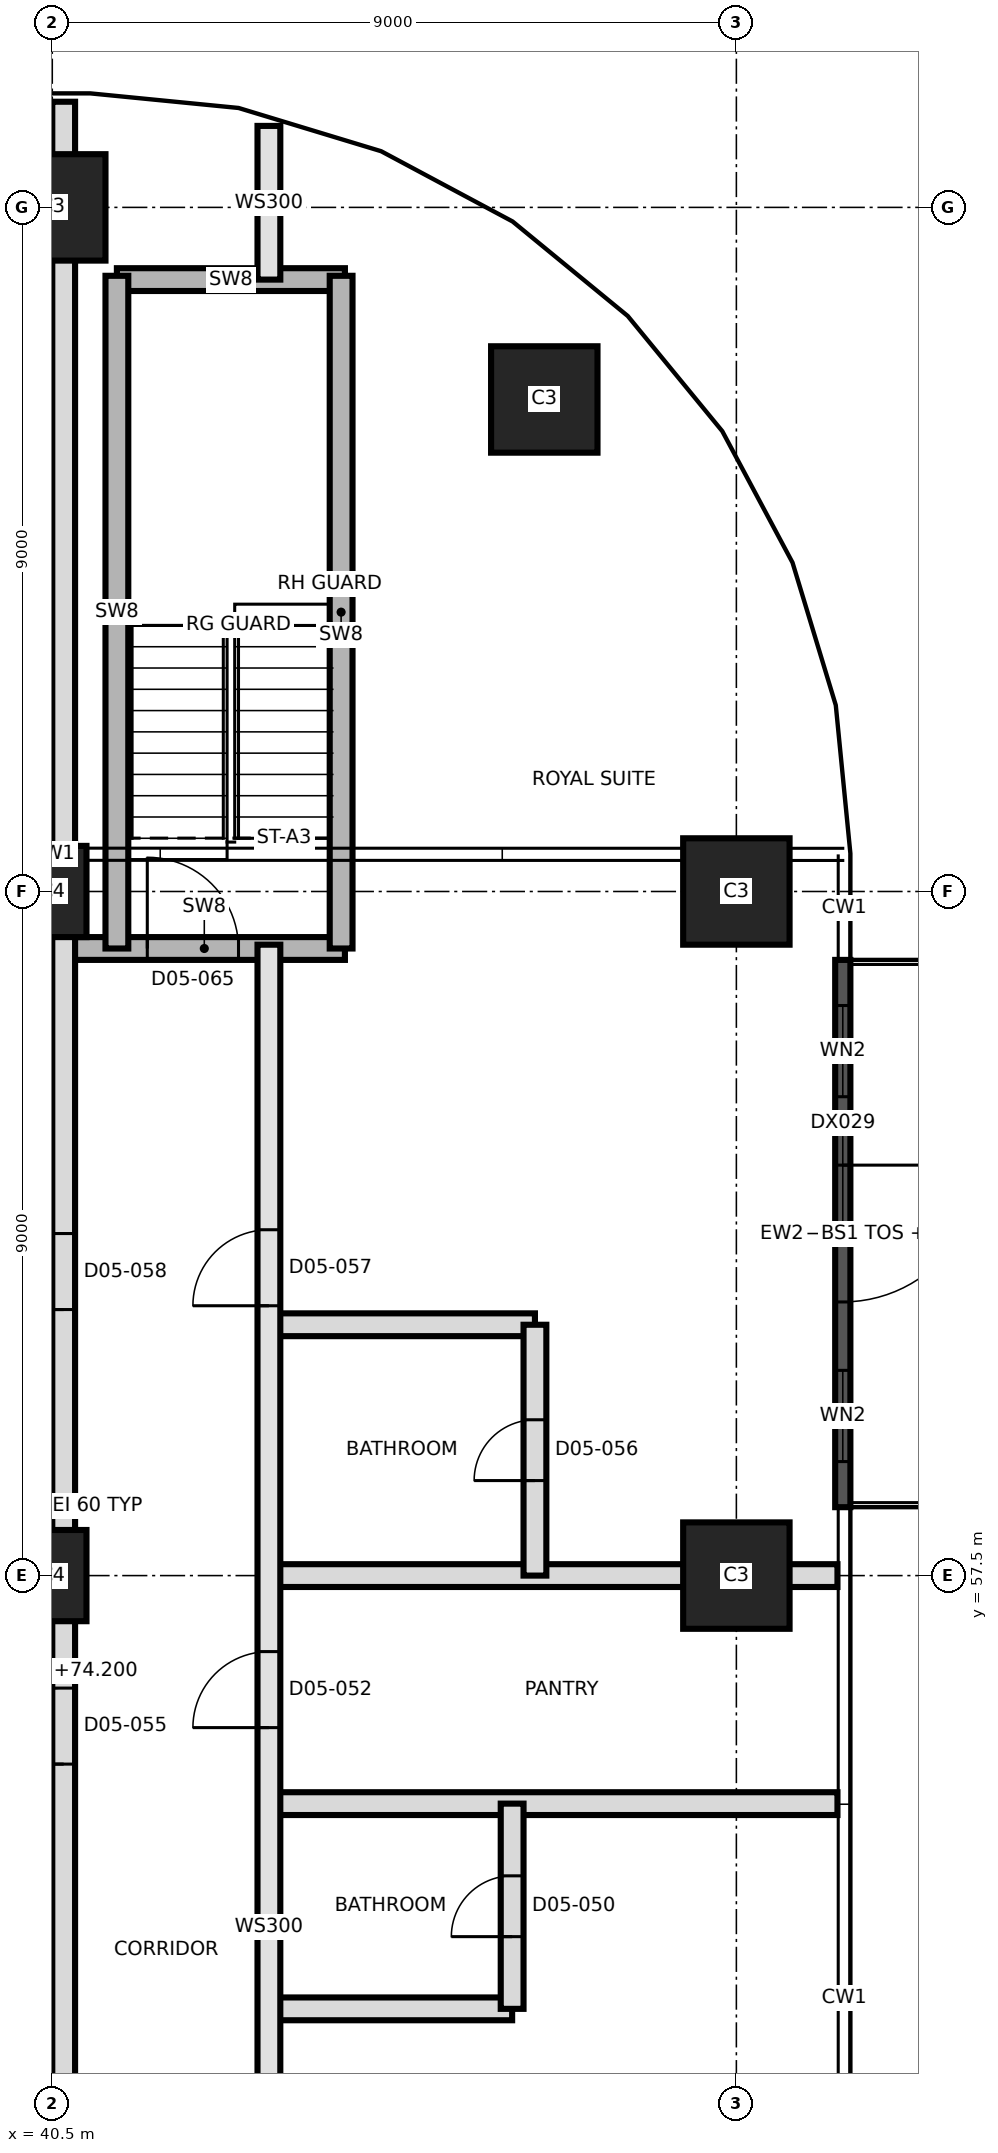
"""IFC4 building model, lengths in metres.
Left out: names, types, materials, properties, quantities, classifications, styles, units other than length and angle.
Written with IfcOpenShell. Run it as: python <this file> out.ifc"""

import sys

from ifc_helpers import new_model, si_unit, direction, frame, frame_2d, origin, origin_2d, place, context, subcontext, project, spatial, rectangle, extrude, element, fill, save


model = new_model("IFC4")
c1 = context("Model", 3, precision=1e-05, world=origin(), true_north=direction((0.0, 1.0)))
c2 = subcontext(c1, "Body", "Model", "MODEL_VIEW")
j1 = project(units=[si_unit("LENGTHUNIT", "METRE"), si_unit("PLANEANGLEUNIT", "RADIAN")], contexts=[c1])
p1 = place(None, origin())
s1 = spatial("IfcSite", under=j1, at=p1, CompositionType="ELEMENT")
p2 = place(p1, origin())
s2 = spatial("IfcBuilding", under=s1, at=p2, CompositionType="ELEMENT")
p3 = place(p2, frame((0.0, 0.0, 74.2)))
s3 = spatial("IfcBuildingStorey", under=s2, at=p3, CompositionType="ELEMENT", Elevation=74.2)
p4 = place(p3, frame((40.5, 57.5, 0.0), z_axis=(0.0, 0.0, 1.0), x_axis=(0.0, 1.0, 0.0)))
e1 = element("IfcColumn", 1, at=p4, inside=s3, PredefinedType="COLUMN", context=c2, shape_type="SweptSolid", body=[
    extrude(rectangle(XDim=1.2, YDim=0.9, at=origin_2d()), origin(), (0.0, 0.0, 1.0), 3.7),
])
p5 = place(p3, frame((49.5, 57.5, 0.0), z_axis=(0.0, 0.0, 1.0), x_axis=(1.0, 0.0, 0.0)))
e2 = element("IfcColumn", 2, at=p5, inside=s3, PredefinedType="COLUMN", context=c2, shape_type="SweptSolid", body=[
    extrude(rectangle(XDim=1.4, YDim=1.4, at=origin_2d()), origin(), (0.0, 0.0, 1.0), 3.7),
])
p6 = place(p3, frame((40.5, 66.5, 0.0), z_axis=(0.0, 0.0, 1.0), x_axis=(0.0, 1.0, 0.0)))
e3 = element("IfcColumn", 3, at=p6, inside=s3, PredefinedType="COLUMN", context=c2, shape_type="SweptSolid", body=[
    extrude(rectangle(XDim=1.2, YDim=0.9, at=origin_2d()), origin(), (0.0, 0.0, 1.0), 3.7),
])
for number, where, z_axis, x_axis in (
    (4, (49.5, 66.5, 0.0), (0.0, 0.0, 1.0), (1.0, 0.0, 0.0)),
    (5, (46.973, 72.973, 0.0), (0.0, 0.0, 1.0), (1.0, 0.0, 0.0)),
    (6, (40.5, 75.5, 0.0), (0.0, 0.0, 1.0), (1.0, 0.0, 0.0)),
):
    element("IfcColumn", number, at=place(p3, frame(where, z_axis=z_axis, x_axis=x_axis)), inside=s3, PredefinedType="COLUMN", context=c2, shape_type="SweptSolid", body=[
        extrude(rectangle(XDim=1.4, YDim=1.4, at=origin_2d()), origin(), (0.0, 0.0, 1.0), 3.7),
    ])
p7 = place(p3, frame((50.9, 65.6, 0.0), z_axis=(0.0, 0.0, 1.0), x_axis=(0.0, -1.0, 0.0)))
e7 = element("IfcWall", 7, at=p7, inside=s3, PredefinedType="SOLIDWALL", context=c2, shape_type="SweptSolid", body=[
    extrude(rectangle(XDim=7.2, YDim=0.2, at=frame_2d((3.6, 0.0))), origin(), (0.0, 0.0, 1.0), 3.4),
])
p8 = place(p7, frame((2.7, 0.0, 0.0)))
e8 = element("IfcOpeningElement", 8, at=p8, cuts=e7, PredefinedType="OPENING", context=c2, shape_type="SweptSolid", body=[
    extrude(rectangle(XDim=1.8, YDim=2.4, at=frame_2d((0.9, 1.2))), frame((0.0, 0.11, 0.0), z_axis=(0.0, -1.0, 0.0), x_axis=(1.0, 0.0, 0.0)), (0.0, 0.0, 1.0), 0.22),
])
p9 = place(p7, frame((5.4, 0.0, 0.9)))
e9 = element("IfcOpeningElement", 9, at=p9, cuts=e7, PredefinedType="OPENING", context=c2, shape_type="SweptSolid", body=[
    extrude(rectangle(XDim=1.2, YDim=2.1, at=frame_2d((0.6, 1.05))), frame((0.0, 0.11, 0.0), z_axis=(0.0, -1.0, 0.0), x_axis=(1.0, 0.0, 0.0)), (0.0, 0.0, 1.0), 0.22),
])
p10 = place(p7, frame((0.6, 0.0, 0.9)))
e10 = element("IfcOpeningElement", 10, at=p10, cuts=e7, PredefinedType="OPENING", context=c2, shape_type="SweptSolid", body=[
    extrude(rectangle(XDim=1.2, YDim=2.1, at=frame_2d((0.6, 1.05))), frame((0.0, 0.11, 0.0), z_axis=(0.0, -1.0, 0.0), x_axis=(1.0, 0.0, 0.0)), (0.0, 0.0, 1.0), 0.22),
])
for number, where, z_axis, x_axis in (
    (11, (37.45, 50.84, 0.0), (0.0, 0.0, 1.0), (1.0, 0.0, 0.0)),
    (12, (43.35, 51.8, 0.0), (0.0, 0.0, 1.0), (1.0, 0.0, 0.0)),
):
    element("IfcWall", number, at=place(p3, frame(where, z_axis=z_axis, x_axis=x_axis)), inside=s3, PredefinedType="PARTITIONING", context=c2, shape_type="SweptSolid", body=[
        extrude(rectangle(XDim=3.2, YDim=0.3, at=frame_2d((1.6, 0.0))), origin(), (0.0, 0.0, 1.0), 3.4),
    ])
p11 = place(p3, frame((30.35, 53.54, 0.0), z_axis=(0.0, 0.0, 1.0), x_axis=(1.0, 0.0, 0.0)))
e13 = element("IfcWall", 13, at=p11, inside=s3, PredefinedType="PARTITIONING", context=c2, shape_type="SweptSolid", body=[
    extrude(rectangle(XDim=10.3, YDim=0.3, at=frame_2d((5.15, 0.0))), origin(), (0.0, 0.0, 1.0), 3.4),
])
p12 = place(p3, frame((43.35, 54.5, 0.0), z_axis=(0.0, 0.0, 1.0), x_axis=(1.0, 0.0, 0.0)))
e14 = element("IfcWall", 14, at=p12, inside=s3, PredefinedType="PARTITIONING", context=c2, shape_type="SweptSolid", body=[
    extrude(rectangle(XDim=7.48, YDim=0.3, at=frame_2d((3.74, 0.0))), origin(), (0.0, 0.0, 1.0), 3.4),
])
p13 = place(p3, frame((30.35, 57.5, 0.0), z_axis=(0.0, 0.0, 1.0), x_axis=(1.0, 0.0, 0.0)))
e15 = element("IfcWall", 15, at=p13, inside=s3, PredefinedType="PARTITIONING", context=c2, shape_type="SweptSolid", body=[
    extrude(rectangle(XDim=10.3, YDim=0.3, at=frame_2d((5.15, 0.0))), origin(), (0.0, 0.0, 1.0), 3.4),
])
p14 = place(p3, frame((43.35, 57.5, 0.0), z_axis=(0.0, 0.0, 1.0), x_axis=(1.0, 0.0, 0.0)))
e16 = element("IfcWall", 16, at=p14, inside=s3, PredefinedType="PARTITIONING", context=c2, shape_type="SweptSolid", body=[
    extrude(rectangle(XDim=7.48, YDim=0.3, at=frame_2d((3.74, 0.0))), origin(), (0.0, 0.0, 1.0), 3.4),
])
p15 = place(p3, frame((43.35, 60.8, 0.0), z_axis=(0.0, 0.0, 1.0), x_axis=(1.0, 0.0, 0.0)))
e17 = element("IfcWall", 17, at=p15, inside=s3, PredefinedType="PARTITIONING", context=c2, shape_type="SweptSolid", body=[
    extrude(rectangle(XDim=3.5, YDim=0.3, at=frame_2d((1.75, 0.0))), origin(), (0.0, 0.0, 1.0), 3.4),
])
p16 = place(p3, frame((40.65, 65.75, 0.0), z_axis=(0.0, 0.0, 1.0), x_axis=(1.0, 0.0, 0.0)))
e18 = element("IfcWall", 18, at=p16, inside=s3, PredefinedType="SHEAR", context=c2, shape_type="SweptSolid", body=[
    extrude(rectangle(XDim=3.7, YDim=0.3, at=frame_2d((1.85, 0.0))), origin(), (0.0, 0.0, 1.0), 3.4),
])
p17 = place(p16, frame((1.1, 0.0, 0.0)))
e19 = element("IfcOpeningElement", 19, at=p17, cuts=e18, PredefinedType="OPENING", context=c2, shape_type="SweptSolid", body=[
    extrude(rectangle(XDim=1.2, YDim=2.1, at=frame_2d((0.6, 1.05))), frame((0.0, 0.16, 0.0), z_axis=(0.0, -1.0, 0.0), x_axis=(1.0, 0.0, 0.0)), (0.0, 0.0, 1.0), 0.32),
])
p18 = place(p3, frame((31.191, 71.4, 0.0), z_axis=(0.0, 0.0, 1.0), x_axis=(1.0, 0.0, 0.0)))
e20 = element("IfcWall", 20, at=p18, inside=s3, PredefinedType="PARTITIONING", context=c2, shape_type="SweptSolid", body=[
    extrude(rectangle(XDim=9.459, YDim=0.3, at=frame_2d((4.729, 0.0))), origin(), (0.0, 0.0, 1.0), 3.4),
])
p19 = place(p18, frame((3.809, 0.0, 0.0)))
e21 = element("IfcOpeningElement", 21, at=p19, cuts=e20, PredefinedType="OPENING", context=c2, shape_type="SweptSolid", body=[
    extrude(rectangle(XDim=1.0, YDim=2.1, at=frame_2d((0.5, 1.05))), frame((0.0, 0.16, 0.0), z_axis=(0.0, -1.0, 0.0), x_axis=(1.0, 0.0, 0.0)), (0.0, 0.0, 1.0), 0.32),
])
p20 = place(p3, frame((41.35, 74.55, 0.0), z_axis=(0.0, 0.0, 1.0), x_axis=(1.0, 0.0, 0.0)))
e22 = element("IfcWall", 22, at=p20, inside=s3, PredefinedType="SHEAR", context=c2, shape_type="SweptSolid", body=[
    extrude(rectangle(XDim=3.0, YDim=0.3, at=frame_2d((1.5, 0.0))), origin(), (0.0, 0.0, 1.0), 3.4),
])
p21 = place(p3, frame((37.15, 74.7, 0.0), z_axis=(0.0, 0.0, 1.0), x_axis=(1.0, 0.0, 0.0)))
e23 = element("IfcWall", 23, at=p21, inside=s3, PredefinedType="PARTITIONING", context=c2, shape_type="SweptSolid", body=[
    extrude(rectangle(XDim=3.5, YDim=0.3, at=frame_2d((1.75, 0.0))), origin(), (0.0, 0.0, 1.0), 3.4),
])
p22 = place(p3, frame((40.65, 39.95, 0.0), z_axis=(0.0, 0.0, 1.0), x_axis=(0.0, 1.0, 0.0)))
e24 = element("IfcWall", 24, at=p22, inside=s3, PredefinedType="PARTITIONING", context=c2, shape_type="SweptSolid", body=[
    extrude(rectangle(XDim=36.94, YDim=0.3, at=frame_2d((18.47, 0.0))), origin(), (0.0, 0.0, 1.0), 3.4),
])
p23 = place(p22, frame((0.7, 0.0, 0.0)))
e25 = element("IfcOpeningElement", 25, at=p23, cuts=e24, PredefinedType="OPENING", context=c2, shape_type="SweptSolid", body=[
    extrude(rectangle(XDim=1.0, YDim=2.1, at=frame_2d((0.5, 1.05))), frame((0.0, 0.16, 0.0), z_axis=(0.0, -1.0, 0.0), x_axis=(1.0, 0.0, 0.0)), (0.0, 0.0, 1.0), 0.32),
])
p24 = place(p22, frame((6.55, 0.0, 0.0)))
e26 = element("IfcOpeningElement", 26, at=p24, cuts=e24, PredefinedType="OPENING", context=c2, shape_type="SweptSolid", body=[
    extrude(rectangle(XDim=1.0, YDim=2.1, at=frame_2d((0.5, 1.05))), frame((0.0, 0.16, 0.0), z_axis=(0.0, -1.0, 0.0), x_axis=(1.0, 0.0, 0.0)), (0.0, 0.0, 1.0), 0.32),
])
p25 = place(p22, frame((9.22, 0.0, 0.0)))
e27 = element("IfcOpeningElement", 27, at=p25, cuts=e24, PredefinedType="OPENING", context=c2, shape_type="SweptSolid", body=[
    extrude(rectangle(XDim=1.0, YDim=2.1, at=frame_2d((0.5, 1.05))), frame((0.0, 0.16, 0.0), z_axis=(0.0, -1.0, 0.0), x_axis=(1.0, 0.0, 0.0)), (0.0, 0.0, 1.0), 0.32),
])
p26 = place(p22, frame((15.07, 0.0, 0.0)))
e28 = element("IfcOpeningElement", 28, at=p26, cuts=e24, PredefinedType="OPENING", context=c2, shape_type="SweptSolid", body=[
    extrude(rectangle(XDim=1.0, YDim=2.1, at=frame_2d((0.5, 1.05))), frame((0.0, 0.16, 0.0), z_axis=(0.0, -1.0, 0.0), x_axis=(1.0, 0.0, 0.0)), (0.0, 0.0, 1.0), 0.32),
])
p27 = place(p22, frame((21.05, 0.0, 0.0)))
e29 = element("IfcOpeningElement", 29, at=p27, cuts=e24, PredefinedType="OPENING", context=c2, shape_type="SweptSolid", body=[
    extrude(rectangle(XDim=1.0, YDim=2.4, at=frame_2d((0.5, 1.2))), frame((0.0, 0.16, 0.0), z_axis=(0.0, -1.0, 0.0), x_axis=(1.0, 0.0, 0.0)), (0.0, 0.0, 1.0), 0.32),
])
p28 = place(p3, frame((41.35, 65.75, 0.0), z_axis=(0.0, 0.0, 1.0), x_axis=(0.0, 1.0, 0.0)))
e30 = element("IfcWall", 30, at=p28, inside=s3, PredefinedType="SHEAR", context=c2, shape_type="SweptSolid", body=[
    extrude(rectangle(XDim=8.85, YDim=0.3, at=frame_2d((4.425, 0.0))), origin(), (0.0, 0.0, 1.0), 3.4),
])
p29 = place(p3, frame((43.35, 39.95, 0.0), z_axis=(0.0, 0.0, 1.0), x_axis=(0.0, 1.0, 0.0)))
e31 = element("IfcWall", 31, at=p29, inside=s3, PredefinedType="SOLIDWALL", context=c2, shape_type="SweptSolid", body=[
    extrude(rectangle(XDim=25.85, YDim=0.3, at=frame_2d((12.925, 0.0))), origin(), (0.0, 0.0, 1.0), 3.4),
])
p30 = place(p29, frame((3.55, 0.0, 0.0)))
e32 = element("IfcOpeningElement", 32, at=p30, cuts=e31, PredefinedType="OPENING", context=c2, shape_type="SweptSolid", body=[
    extrude(rectangle(XDim=1.0, YDim=2.4, at=frame_2d((0.5, 1.2))), frame((0.0, 0.16, 0.0), z_axis=(0.0, -1.0, 0.0), x_axis=(1.0, 0.0, 0.0)), (0.0, 0.0, 1.0), 0.32),
])
p31 = place(p29, frame((9.7, 0.0, 0.0)))
e33 = element("IfcOpeningElement", 33, at=p31, cuts=e31, PredefinedType="OPENING", context=c2, shape_type="SweptSolid", body=[
    extrude(rectangle(XDim=1.0, YDim=2.1, at=frame_2d((0.5, 1.05))), frame((0.0, 0.16, 0.0), z_axis=(0.0, -1.0, 0.0), x_axis=(1.0, 0.0, 0.0)), (0.0, 0.0, 1.0), 0.32),
])
p32 = place(p29, frame((15.55, 0.0, 0.0)))
e34 = element("IfcOpeningElement", 34, at=p32, cuts=e31, PredefinedType="OPENING", context=c2, shape_type="SweptSolid", body=[
    extrude(rectangle(XDim=1.0, YDim=2.1, at=frame_2d((0.5, 1.05))), frame((0.0, 0.16, 0.0), z_axis=(0.0, -1.0, 0.0), x_axis=(1.0, 0.0, 0.0)), (0.0, 0.0, 1.0), 0.32),
])
p33 = place(p29, frame((21.1, 0.0, 0.0)))
e35 = element("IfcOpeningElement", 35, at=p33, cuts=e31, PredefinedType="OPENING", context=c2, shape_type="SweptSolid", body=[
    extrude(rectangle(XDim=1.0, YDim=2.4, at=frame_2d((0.5, 1.2))), frame((0.0, 0.16, 0.0), z_axis=(0.0, -1.0, 0.0), x_axis=(1.0, 0.0, 0.0)), (0.0, 0.0, 1.0), 0.32),
])
p34 = place(p3, frame((43.35, 74.55, 0.0), z_axis=(0.0, 0.0, 1.0), x_axis=(0.0, 1.0, 0.0)))
e36 = element("IfcWall", 36, at=p34, inside=s3, PredefinedType="SOLIDWALL", context=c2, shape_type="SweptSolid", body=[
    extrude(rectangle(XDim=2.022, YDim=0.3, at=frame_2d((1.011, 0.0))), origin(), (0.0, 0.0, 1.0), 3.4),
])
p35 = place(p3, frame((44.3, 65.75, 0.0), z_axis=(0.0, 0.0, 1.0), x_axis=(0.0, 1.0, 0.0)))
e37 = element("IfcWall", 37, at=p35, inside=s3, PredefinedType="SHEAR", context=c2, shape_type="SweptSolid", body=[
    extrude(rectangle(XDim=8.85, YDim=0.3, at=frame_2d((4.425, 0.0))), origin(), (0.0, 0.0, 1.0), 3.4),
])
p36 = place(p3, frame((46.55, 51.8, 0.0), z_axis=(0.0, 0.0, 1.0), x_axis=(0.0, 1.0, 0.0)))
e38 = element("IfcWall", 38, at=p36, inside=s3, PredefinedType="PARTITIONING", context=c2, shape_type="SweptSolid", body=[
    extrude(rectangle(XDim=2.7, YDim=0.3, at=frame_2d((1.35, 0.0))), origin(), (0.0, 0.0, 1.0), 3.4),
])
p37 = place(p36, frame((0.95, 0.0, 0.0)))
e39 = element("IfcOpeningElement", 39, at=p37, cuts=e38, PredefinedType="OPENING", context=c2, shape_type="SweptSolid", body=[
    extrude(rectangle(XDim=0.8, YDim=2.1, at=frame_2d((0.4, 1.05))), frame((0.0, 0.16, 0.0), z_axis=(0.0, -1.0, 0.0), x_axis=(1.0, 0.0, 0.0)), (0.0, 0.0, 1.0), 0.32),
])
p38 = place(p3, frame((46.85, 57.5, 0.0), z_axis=(0.0, 0.0, 1.0), x_axis=(0.0, 1.0, 0.0)))
e40 = element("IfcWall", 40, at=p38, inside=s3, PredefinedType="PARTITIONING", context=c2, shape_type="SweptSolid", body=[
    extrude(rectangle(XDim=3.3, YDim=0.3, at=frame_2d((1.65, 0.0))), origin(), (0.0, 0.0, 1.0), 3.4),
])
p39 = place(p38, frame((1.25, 0.0, 0.0)))
e41 = element("IfcOpeningElement", 41, at=p39, cuts=e40, PredefinedType="OPENING", context=c2, shape_type="SweptSolid", body=[
    extrude(rectangle(XDim=0.8, YDim=2.1, at=frame_2d((0.4, 1.05))), frame((0.0, 0.16, 0.0), z_axis=(0.0, -1.0, 0.0), x_axis=(1.0, 0.0, 0.0)), (0.0, 0.0, 1.0), 0.32),
])
p40 = place(p8, origin())
e42 = element("IfcDoor", 42, at=p40, inside=s3, OperationType="SINGLE_SWING_LEFT", PredefinedType="DOOR", context=c2, shape_type="SweptSolid", body=[
    extrude(rectangle(XDim=1.8, YDim=2.4, at=frame_2d((0.9, 1.2))), frame((0.0, 0.025, 0.0), z_axis=(0.0, -1.0, 0.0), x_axis=(1.0, 0.0, 0.0)), (0.0, 0.0, 1.0), 0.05),
])
fill(e8, e42)
p41 = place(p9, origin())
e43 = element("IfcWindow", 43, at=p41, inside=s3, PartitioningType="SINGLE_PANEL", PredefinedType="WINDOW", context=c2, shape_type="SweptSolid", body=[
    extrude(rectangle(XDim=1.2, YDim=2.1, at=frame_2d((0.6, 1.05))), frame((0.0, 0.03, 0.0), z_axis=(0.0, -1.0, 0.0), x_axis=(1.0, 0.0, 0.0)), (0.0, 0.0, 1.0), 0.06),
])
fill(e9, e43)
p42 = place(p10, origin())
e44 = element("IfcWindow", 44, at=p42, inside=s3, PartitioningType="SINGLE_PANEL", PredefinedType="WINDOW", context=c2, shape_type="SweptSolid", body=[
    extrude(rectangle(XDim=1.2, YDim=2.1, at=frame_2d((0.6, 1.05))), frame((0.0, 0.03, 0.0), z_axis=(0.0, -1.0, 0.0), x_axis=(1.0, 0.0, 0.0)), (0.0, 0.0, 1.0), 0.06),
])
fill(e10, e44)
p43 = place(p37, origin())
e45 = element("IfcDoor", 45, at=p43, inside=s3, OperationType="SINGLE_SWING_LEFT", PredefinedType="DOOR", context=c2, shape_type="SweptSolid", body=[
    extrude(rectangle(XDim=0.8, YDim=2.1, at=frame_2d((0.4, 1.05))), frame((0.0, 0.025, 0.0), z_axis=(0.0, -1.0, 0.0), x_axis=(1.0, 0.0, 0.0)), (0.0, 0.0, 1.0), 0.05),
])
fill(e39, e45)
p44 = place(p32, origin())
e46 = element("IfcDoor", 46, at=p44, inside=s3, OperationType="SINGLE_SWING_RIGHT", PredefinedType="DOOR", context=c2, shape_type="SweptSolid", body=[
    extrude(rectangle(XDim=1.0, YDim=2.1, at=frame_2d((0.5, 1.05))), frame((0.0, 0.025, 0.0), z_axis=(0.0, -1.0, 0.0), x_axis=(1.0, 0.0, 0.0)), (0.0, 0.0, 1.0), 0.05),
])
fill(e34, e46)
p45 = place(p26, origin())
e47 = element("IfcDoor", 47, at=p45, inside=s3, OperationType="SINGLE_SWING_RIGHT", PredefinedType="DOOR", context=c2, shape_type="SweptSolid", body=[
    extrude(rectangle(XDim=1.0, YDim=2.1, at=frame_2d((0.5, 1.05))), frame((0.0, 0.025, 0.0), z_axis=(0.0, -1.0, 0.0), x_axis=(1.0, 0.0, 0.0)), (0.0, 0.0, 1.0), 0.05),
])
fill(e28, e47)
p46 = place(p39, origin())
e48 = element("IfcDoor", 48, at=p46, inside=s3, OperationType="SINGLE_SWING_LEFT", PredefinedType="DOOR", context=c2, shape_type="SweptSolid", body=[
    extrude(rectangle(XDim=0.8, YDim=2.1, at=frame_2d((0.4, 1.05))), frame((0.0, 0.025, 0.0), z_axis=(0.0, -1.0, 0.0), x_axis=(1.0, 0.0, 0.0)), (0.0, 0.0, 1.0), 0.05),
])
fill(e41, e48)
p47 = place(p33, origin())
e49 = element("IfcDoor", 49, at=p47, inside=s3, OperationType="SINGLE_SWING_LEFT", PredefinedType="DOOR", context=c2, shape_type="SweptSolid", body=[
    extrude(rectangle(XDim=1.0, YDim=2.4, at=frame_2d((0.5, 1.2))), frame((0.0, 0.025, 0.0), z_axis=(0.0, -1.0, 0.0), x_axis=(1.0, 0.0, 0.0)), (0.0, 0.0, 1.0), 0.05),
])
fill(e35, e49)
p48 = place(p27, origin())
e50 = element("IfcDoor", 50, at=p48, inside=s3, OperationType="SINGLE_SWING_RIGHT", PredefinedType="DOOR", context=c2, shape_type="SweptSolid", body=[
    extrude(rectangle(XDim=1.0, YDim=2.4, at=frame_2d((0.5, 1.2))), frame((0.0, 0.025, 0.0), z_axis=(0.0, -1.0, 0.0), x_axis=(1.0, 0.0, 0.0)), (0.0, 0.0, 1.0), 0.05),
])
fill(e29, e50)
p49 = place(p17, origin())
e51 = element("IfcDoor", 51, at=p49, inside=s3, OperationType="SINGLE_SWING_RIGHT", PredefinedType="DOOR", context=c2, shape_type="SweptSolid", body=[
    extrude(rectangle(XDim=1.2, YDim=2.1, at=frame_2d((0.6, 1.05))), frame((0.0, 0.025, 0.0), z_axis=(0.0, -1.0, 0.0), x_axis=(1.0, 0.0, 0.0)), (0.0, 0.0, 1.0), 0.05),
])
fill(e19, e51)
save(model, sys.argv[1])
